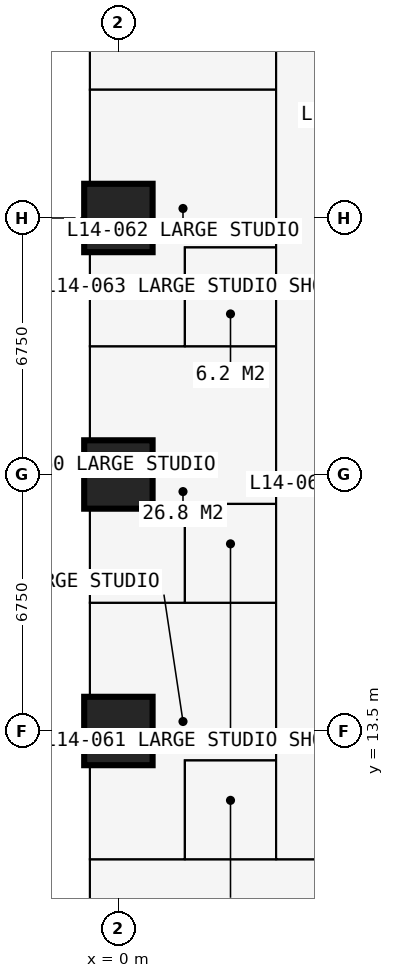
"""IFC4 building model, lengths in metres.
Left out: names, types, materials, properties, quantities, classifications, styles, units other than length and angle.
Written with IfcOpenShell. Run it as: python <this file> out.ifc"""

import sys

from ifc_helpers import new_model, si_unit, direction, frame, frame_2d, origin, origin_2d, place, context, subcontext, project, spatial, rectangle, extrude, element, fill, save


model = new_model("IFC4")
c1 = context("Model", 3, precision=1e-05, world=origin(), true_north=direction((0.0, 1.0)))
c2 = subcontext(c1, "Body", "Model", "MODEL_VIEW")
j1 = project(units=[si_unit("LENGTHUNIT", "METRE"), si_unit("PLANEANGLEUNIT", "RADIAN")], contexts=[c1])
p1 = place(None, origin())
s1 = spatial("IfcSite", under=j1, at=p1, CompositionType="ELEMENT")
p2 = place(p1, origin())
s2 = spatial("IfcBuilding", under=s1, at=p2, CompositionType="ELEMENT")
p3 = place(p2, frame((0.0, 0.0, 54.0)))
s3 = spatial("IfcBuildingStorey", under=s2, at=p3, CompositionType="ELEMENT", Elevation=54.0)
for number, where, z_axis, x_axis in (
    (1, (0.0, 13.5, 0.0), (0.0, 0.0, 1.0), (1.0, 0.0, 0.0)),
    (2, (0.0, 20.25, 0.0), (0.0, 0.0, 1.0), (1.0, 0.0, 0.0)),
    (3, (0.0, 27.0, 0.0), (0.0, 0.0, 1.0), (1.0, 0.0, 0.0)),
):
    element("IfcColumn", number, at=place(p3, frame(where, z_axis=z_axis, x_axis=x_axis)), inside=s3, PredefinedType="COLUMN", context=c2, shape_type="SweptSolid", body=[
        extrude(rectangle(XDim=1.8, YDim=1.8, at=origin_2d()), origin(), (0.0, 0.0, 1.0), 3.6),
    ])
p4 = place(p3, frame((-0.75, 13.5, 0.0), z_axis=(0.0, 0.0, 1.0), x_axis=(0.0, 1.0, 0.0)))
e4 = element("IfcWall", 4, at=p4, inside=s3, PredefinedType="SOLIDWALL", context=c2, shape_type="SweptSolid", body=[
    extrude(rectangle(XDim=6.75, YDim=0.15, at=frame_2d((3.375, 0.0))), origin(), (0.0, 0.0, 1.0), 3.375),
])
p5 = place(p4, frame((0.962, 0.0, 0.0)))
e5 = element("IfcOpeningElement", 5, at=p5, cuts=e4, PredefinedType="OPENING", context=c2, shape_type="SweptSolid", body=[
    extrude(rectangle(XDim=1.0, YDim=2.2, at=frame_2d((0.5, 1.1))), frame((0.0, 0.085, 0.0), z_axis=(0.0, -1.0, 0.0), x_axis=(1.0, 0.0, 0.0)), (0.0, 0.0, 1.0), 0.17),
])
p6 = place(p4, frame((2.025, 0.0, 0.9)))
e6 = element("IfcOpeningElement", 6, at=p6, cuts=e4, PredefinedType="OPENING", context=c2, shape_type="SweptSolid", body=[
    extrude(rectangle(XDim=1.2, YDim=1.8, at=frame_2d((0.6, 0.9))), frame((0.0, 0.085, 0.0), z_axis=(0.0, -1.0, 0.0), x_axis=(1.0, 0.0, 0.0)), (0.0, 0.0, 1.0), 0.17),
])
p7 = place(p4, frame((4.788, 0.0, 0.0)))
e7 = element("IfcOpeningElement", 7, at=p7, cuts=e4, PredefinedType="OPENING", context=c2, shape_type="SweptSolid", body=[
    extrude(rectangle(XDim=1.0, YDim=2.2, at=frame_2d((0.5, 1.1))), frame((0.0, 0.085, 0.0), z_axis=(0.0, -1.0, 0.0), x_axis=(1.0, 0.0, 0.0)), (0.0, 0.0, 1.0), 0.17),
])
p8 = place(p4, frame((3.525, 0.0, 0.9)))
e8 = element("IfcOpeningElement", 8, at=p8, cuts=e4, PredefinedType="OPENING", context=c2, shape_type="SweptSolid", body=[
    extrude(rectangle(XDim=1.2, YDim=1.8, at=frame_2d((0.6, 0.9))), frame((0.0, 0.085, 0.0), z_axis=(0.0, -1.0, 0.0), x_axis=(1.0, 0.0, 0.0)), (0.0, 0.0, 1.0), 0.17),
])
p9 = place(p3, frame((-0.85, 16.875, 0.0), z_axis=(0.0, 0.0, 1.0), x_axis=(-1.0, 0.0, 0.0)))
e9 = element("IfcWall", 9, at=p9, inside=s3, PredefinedType="USERDEFINED", context=c2, shape_type="SweptSolid", body=[
    extrude(rectangle(XDim=2.2, YDim=1.0, at=frame_2d((1.1, 0.0))), origin(), (0.0, 0.0, 1.0), 0.9),
])
p10 = place(p3, frame((-0.734, 10.125, 0.0), z_axis=(0.0, 0.0, 1.0), x_axis=(1.0, 0.0, 0.0)))
e10 = element("IfcWall", 10, at=p10, inside=s3, PredefinedType="PARTITIONING", context=c2, shape_type="SweptSolid", body=[
    extrude(rectangle(XDim=10.859, YDim=0.15, at=frame_2d((5.429, 0.0))), origin(), (0.0, 0.0, 1.0), 3.375),
])
p11 = place(p10, frame((5.134, 0.0, 0.0)))
e11 = element("IfcOpeningElement", 11, at=p11, cuts=e10, PredefinedType="OPENING", context=c2, shape_type="SweptSolid", body=[
    extrude(rectangle(XDim=1.0, YDim=2.2, at=frame_2d((0.5, 1.1))), frame((0.0, 0.085, 0.0), z_axis=(0.0, -1.0, 0.0), x_axis=(1.0, 0.0, 0.0)), (0.0, 0.0, 1.0), 0.17),
])
p12 = place(p3, frame((-0.734, 16.875, 0.0), z_axis=(0.0, 0.0, 1.0), x_axis=(1.0, 0.0, 0.0)))
e12 = element("IfcWall", 12, at=p12, inside=s3, PredefinedType="PARTITIONING", context=c2, shape_type="SweptSolid", body=[
    extrude(rectangle(XDim=4.884, YDim=0.175, at=frame_2d((2.442, 0.0))), origin(), (0.0, 0.0, 1.0), 3.375),
])
p13 = place(p12, frame((3.234, 0.0, 0.0)))
e13 = element("IfcOpeningElement", 13, at=p13, cuts=e12, PredefinedType="OPENING", context=c2, shape_type="SweptSolid", body=[
    extrude(rectangle(XDim=0.9, YDim=2.2, at=frame_2d((0.45, 1.1))), frame((0.0, 0.097, 0.0), z_axis=(0.0, -1.0, 0.0), x_axis=(1.0, 0.0, 0.0)), (0.0, 0.0, 1.0), 0.195),
])
p14 = place(p3, frame((-0.734, 23.625, 0.0), z_axis=(0.0, 0.0, 1.0), x_axis=(1.0, 0.0, 0.0)))
e14 = element("IfcWall", 14, at=p14, inside=s3, PredefinedType="PARTITIONING", context=c2, shape_type="SweptSolid", body=[
    extrude(rectangle(XDim=4.884, YDim=0.175, at=frame_2d((2.442, 0.0))), origin(), (0.0, 0.0, 1.0), 3.375),
])
p15 = place(p14, frame((3.234, 0.0, 0.0)))
e15 = element("IfcOpeningElement", 15, at=p15, cuts=e14, PredefinedType="OPENING", context=c2, shape_type="SweptSolid", body=[
    extrude(rectangle(XDim=0.9, YDim=2.2, at=frame_2d((0.45, 1.1))), frame((0.0, 0.097, 0.0), z_axis=(0.0, -1.0, 0.0), x_axis=(1.0, 0.0, 0.0)), (0.0, 0.0, 1.0), 0.195),
])
p16 = place(p3, frame((-0.734, 30.375, 0.0), z_axis=(0.0, 0.0, 1.0), x_axis=(1.0, 0.0, 0.0)))
e16 = element("IfcWall", 16, at=p16, inside=s3, PredefinedType="PARTITIONING", context=c2, shape_type="SweptSolid", body=[
    extrude(rectangle(XDim=4.884, YDim=0.15, at=frame_2d((2.442, 0.0))), origin(), (0.0, 0.0, 1.0), 3.375),
])
p17 = place(p3, frame((1.75, 10.125, 0.0), z_axis=(0.0, 0.0, 1.0), x_axis=(0.0, 1.0, 0.0)))
e17 = element("IfcWall", 17, at=p17, inside=s3, PredefinedType="PARTITIONING", context=c2, shape_type="SweptSolid", body=[
    extrude(rectangle(XDim=2.6, YDim=0.1, at=frame_2d((1.3, 0.0))), origin(), (0.0, 0.0, 1.0), 3.375),
])
p18 = place(p17, frame((0.85, 0.0, 0.0)))
e18 = element("IfcOpeningElement", 18, at=p18, cuts=e17, PredefinedType="OPENING", context=c2, shape_type="SweptSolid", body=[
    extrude(rectangle(XDim=0.9, YDim=2.2, at=frame_2d((0.45, 1.1))), frame((0.0, 0.06, 0.0), z_axis=(0.0, -1.0, 0.0), x_axis=(1.0, 0.0, 0.0)), (0.0, 0.0, 1.0), 0.12),
])
p19 = place(p3, frame((1.75, 12.725, 0.0), z_axis=(0.0, 0.0, 1.0), x_axis=(1.0, 0.0, 0.0)))
e19 = element("IfcWall", 19, at=p19, inside=s3, PredefinedType="PARTITIONING", context=c2, shape_type="SweptSolid", body=[
    extrude(rectangle(XDim=2.4, YDim=0.1, at=frame_2d((1.2, 0.0))), origin(), (0.0, 0.0, 1.0), 3.375),
])
p20 = place(p3, frame((1.75, 16.875, 0.0), z_axis=(0.0, 0.0, 1.0), x_axis=(0.0, 1.0, 0.0)))
e20 = element("IfcWall", 20, at=p20, inside=s3, PredefinedType="PARTITIONING", context=c2, shape_type="SweptSolid", body=[
    extrude(rectangle(XDim=2.6, YDim=0.1, at=frame_2d((1.3, 0.0))), origin(), (0.0, 0.0, 1.0), 3.375),
])
p21 = place(p3, frame((1.75, 19.475, 0.0), z_axis=(0.0, 0.0, 1.0), x_axis=(1.0, 0.0, 0.0)))
e21 = element("IfcWall", 21, at=p21, inside=s3, PredefinedType="PARTITIONING", context=c2, shape_type="SweptSolid", body=[
    extrude(rectangle(XDim=2.4, YDim=0.1, at=frame_2d((1.2, 0.0))), origin(), (0.0, 0.0, 1.0), 3.375),
])
p22 = place(p3, frame((1.75, 23.625, 0.0), z_axis=(0.0, 0.0, 1.0), x_axis=(0.0, 1.0, 0.0)))
e22 = element("IfcWall", 22, at=p22, inside=s3, PredefinedType="PARTITIONING", context=c2, shape_type="SweptSolid", body=[
    extrude(rectangle(XDim=2.6, YDim=0.1, at=frame_2d((1.3, 0.0))), origin(), (0.0, 0.0, 1.0), 3.375),
])
p23 = place(p3, frame((1.75, 26.225, 0.0), z_axis=(0.0, 0.0, 1.0), x_axis=(1.0, 0.0, 0.0)))
e23 = element("IfcWall", 23, at=p23, inside=s3, PredefinedType="PARTITIONING", context=c2, shape_type="SweptSolid", body=[
    extrude(rectangle(XDim=2.4, YDim=0.1, at=frame_2d((1.2, 0.0))), origin(), (0.0, 0.0, 1.0), 3.375),
])
p24 = place(p3, frame((4.15, 10.125, 0.0), z_axis=(0.0, 0.0, 1.0), x_axis=(0.0, 1.0, 0.0)))
e24 = element("IfcWall", 24, at=p24, inside=s3, PredefinedType="PARTITIONING", context=c2, shape_type="SweptSolid", body=[
    extrude(rectangle(XDim=23.625, YDim=0.15, at=frame_2d((11.812, 0.0))), origin(), (0.0, 0.0, 1.0), 3.375),
])
p25 = place(p24, frame((4.2, 0.0, 0.0)))
e25 = element("IfcOpeningElement", 25, at=p25, cuts=e24, PredefinedType="OPENING", context=c2, shape_type="SweptSolid", body=[
    extrude(rectangle(XDim=0.95, YDim=2.2, at=frame_2d((0.475, 1.1))), frame((0.0, 0.085, 0.0), z_axis=(0.0, -1.0, 0.0), x_axis=(1.0, 0.0, 0.0)), (0.0, 0.0, 1.0), 0.17),
])
p26 = place(p24, frame((10.95, 0.0, 0.0)))
e26 = element("IfcOpeningElement", 26, at=p26, cuts=e24, PredefinedType="OPENING", context=c2, shape_type="SweptSolid", body=[
    extrude(rectangle(XDim=0.95, YDim=2.2, at=frame_2d((0.475, 1.1))), frame((0.0, 0.085, 0.0), z_axis=(0.0, -1.0, 0.0), x_axis=(1.0, 0.0, 0.0)), (0.0, 0.0, 1.0), 0.17),
])
p27 = place(p24, frame((17.7, 0.0, 0.0)))
e27 = element("IfcOpeningElement", 27, at=p27, cuts=e24, PredefinedType="OPENING", context=c2, shape_type="SweptSolid", body=[
    extrude(rectangle(XDim=0.95, YDim=2.2, at=frame_2d((0.475, 1.1))), frame((0.0, 0.085, 0.0), z_axis=(0.0, -1.0, 0.0), x_axis=(1.0, 0.0, 0.0)), (0.0, 0.0, 1.0), 0.17),
])
p28 = place(p5, origin())
e28 = element("IfcDoor", 28, at=p28, inside=s3, OperationType="SINGLE_SWING_LEFT", PredefinedType="DOOR", context=c2, shape_type="SweptSolid", body=[
    extrude(rectangle(XDim=1.0, YDim=2.2, at=frame_2d((0.5, 1.1))), frame((0.0, 0.025, 0.0), z_axis=(0.0, -1.0, 0.0), x_axis=(1.0, 0.0, 0.0)), (0.0, 0.0, 1.0), 0.05),
])
fill(e5, e28)
p29 = place(p6, origin())
e29 = element("IfcWindow", 29, at=p29, inside=s3, PartitioningType="SINGLE_PANEL", PredefinedType="WINDOW", context=c2, shape_type="SweptSolid", body=[
    extrude(rectangle(XDim=1.2, YDim=1.8, at=frame_2d((0.6, 0.9))), frame((0.0, 0.03, 0.0), z_axis=(0.0, -1.0, 0.0), x_axis=(1.0, 0.0, 0.0)), (0.0, 0.0, 1.0), 0.06),
])
fill(e6, e29)
p30 = place(p7, origin())
e30 = element("IfcDoor", 30, at=p30, inside=s3, OperationType="SINGLE_SWING_RIGHT", PredefinedType="DOOR", context=c2, shape_type="SweptSolid", body=[
    extrude(rectangle(XDim=1.0, YDim=2.2, at=frame_2d((0.5, 1.1))), frame((0.0, 0.025, 0.0), z_axis=(0.0, -1.0, 0.0), x_axis=(1.0, 0.0, 0.0)), (0.0, 0.0, 1.0), 0.05),
])
fill(e7, e30)
p31 = place(p8, origin())
e31 = element("IfcWindow", 31, at=p31, inside=s3, PartitioningType="SINGLE_PANEL", PredefinedType="WINDOW", context=c2, shape_type="SweptSolid", body=[
    extrude(rectangle(XDim=1.2, YDim=1.8, at=frame_2d((0.6, 0.9))), frame((0.0, 0.03, 0.0), z_axis=(0.0, -1.0, 0.0), x_axis=(1.0, 0.0, 0.0)), (0.0, 0.0, 1.0), 0.06),
])
fill(e8, e31)
p32 = place(p11, origin())
e32 = element("IfcDoor", 32, at=p32, inside=s3, OperationType="SINGLE_SWING_LEFT", PredefinedType="DOOR", context=c2, shape_type="SweptSolid", body=[
    extrude(rectangle(XDim=1.0, YDim=2.2, at=frame_2d((0.5, 1.1))), frame((0.0, 0.025, 0.0), z_axis=(0.0, -1.0, 0.0), x_axis=(1.0, 0.0, 0.0)), (0.0, 0.0, 1.0), 0.05),
])
fill(e11, e32)
p33 = place(p25, origin())
e33 = element("IfcDoor", 33, at=p33, inside=s3, OperationType="SINGLE_SWING_LEFT", PredefinedType="DOOR", context=c2, shape_type="SweptSolid", body=[
    extrude(rectangle(XDim=0.95, YDim=2.2, at=frame_2d((0.475, 1.1))), frame((0.0, 0.025, 0.0), z_axis=(0.0, -1.0, 0.0), x_axis=(1.0, 0.0, 0.0)), (0.0, 0.0, 1.0), 0.05),
])
fill(e25, e33)
p34 = place(p18, origin())
e34 = element("IfcDoor", 34, at=p34, inside=s3, OperationType="SINGLE_SWING_RIGHT", PredefinedType="DOOR", context=c2, shape_type="SweptSolid", body=[
    extrude(rectangle(XDim=0.9, YDim=2.2, at=frame_2d((0.45, 1.1))), frame((0.0, 0.025, 0.0), z_axis=(0.0, -1.0, 0.0), x_axis=(1.0, 0.0, 0.0)), (0.0, 0.0, 1.0), 0.05),
])
fill(e18, e34)
p35 = place(p26, origin())
e35 = element("IfcDoor", 35, at=p35, inside=s3, OperationType="SINGLE_SWING_LEFT", PredefinedType="DOOR", context=c2, shape_type="SweptSolid", body=[
    extrude(rectangle(XDim=0.95, YDim=2.2, at=frame_2d((0.475, 1.1))), frame((0.0, 0.025, 0.0), z_axis=(0.0, -1.0, 0.0), x_axis=(1.0, 0.0, 0.0)), (0.0, 0.0, 1.0), 0.05),
])
fill(e26, e35)
p36 = place(p13, origin())
e36 = element("IfcDoor", 36, at=p36, inside=s3, OperationType="SINGLE_SWING_RIGHT", PredefinedType="DOOR", context=c2, shape_type="SweptSolid", body=[
    extrude(rectangle(XDim=0.9, YDim=2.2, at=frame_2d((0.45, 1.1))), frame((0.0, 0.025, 0.0), z_axis=(0.0, -1.0, 0.0), x_axis=(1.0, 0.0, 0.0)), (0.0, 0.0, 1.0), 0.05),
])
fill(e13, e36)
p37 = place(p27, origin())
e37 = element("IfcDoor", 37, at=p37, inside=s3, OperationType="SINGLE_SWING_LEFT", PredefinedType="DOOR", context=c2, shape_type="SweptSolid", body=[
    extrude(rectangle(XDim=0.95, YDim=2.2, at=frame_2d((0.475, 1.1))), frame((0.0, 0.025, 0.0), z_axis=(0.0, -1.0, 0.0), x_axis=(1.0, 0.0, 0.0)), (0.0, 0.0, 1.0), 0.05),
])
fill(e27, e37)
p38 = place(p15, origin())
e38 = element("IfcDoor", 38, at=p38, inside=s3, OperationType="SINGLE_SWING_RIGHT", PredefinedType="DOOR", context=c2, shape_type="SweptSolid", body=[
    extrude(rectangle(XDim=0.9, YDim=2.2, at=frame_2d((0.45, 1.1))), frame((0.0, 0.025, 0.0), z_axis=(0.0, -1.0, 0.0), x_axis=(1.0, 0.0, 0.0)), (0.0, 0.0, 1.0), 0.05),
])
fill(e15, e38)
save(model, sys.argv[1])
